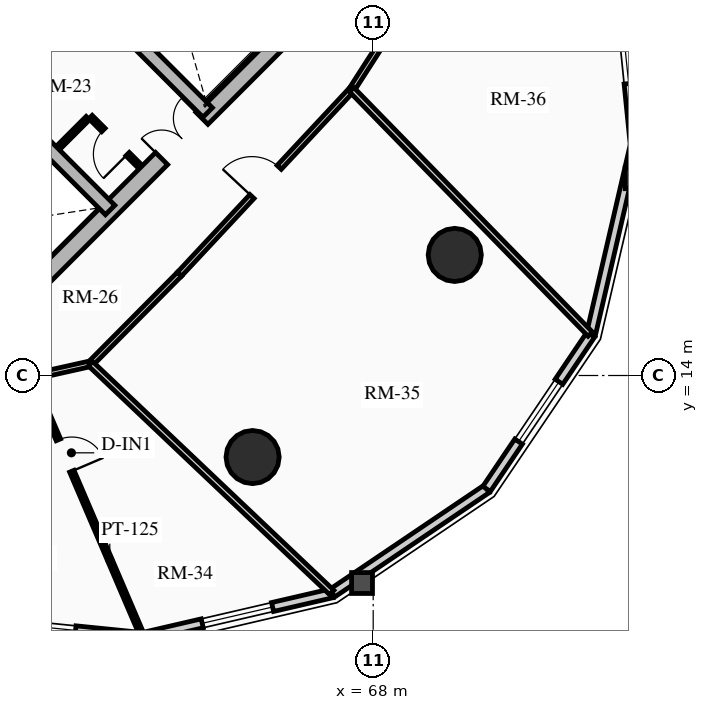
"""IFC4 building model, lengths in metres.
Left out: names, types, materials, properties, quantities, classifications, styles, units other than length and angle.
Written with IfcOpenShell. Run it as: python <this file> out.ifc"""

import sys

from ifc_helpers import new_model, si_unit, direction, frame, frame_2d, origin, origin_2d, place, context, subcontext, project, spatial, rectangle, circle, extrude, source, transform, mapped, element, fill, save


model = new_model("IFC4")
c1 = context("Model", 3, precision=1e-05, world=origin(), true_north=direction((0.0, 1.0)))
c2 = subcontext(c1, "Body", "Model", "MODEL_VIEW")
j1 = project(units=[si_unit("LENGTHUNIT", "METRE"), si_unit("PLANEANGLEUNIT", "RADIAN")], contexts=[c1])
p1 = place(None, origin())
s1 = spatial("IfcSite", under=j1, at=p1, CompositionType="ELEMENT")
p2 = place(p1, origin())
s2 = spatial("IfcBuilding", under=s1, at=p2, CompositionType="ELEMENT")
p3 = place(p2, frame((0.0, 0.0, 81.79)))
s3 = spatial("IfcBuildingStorey", under=s2, at=p3, CompositionType="ELEMENT", Elevation=81.79)
p4 = place(p3, frame((58.578, 15.856, 0.0), z_axis=(0.0, 0.0, 1.0), x_axis=(0.707106781187, 0.707106781187, 0.0)))
e1 = element("IfcWall", 1, at=p4, inside=s3, PredefinedType="SHEAR", context=c2, shape_type="SweptSolid", body=[
    extrude(rectangle(XDim=10.7, YDim=0.45, at=frame_2d((5.35, 0.0))), origin(), (0.0, 0.0, 1.0), 2.91),
])
m1 = source(origin(), c2, "Body", "SweptSolid", [
    extrude(rectangle(XDim=1.5, YDim=2.02, at=frame_2d((0.75, 1.01))), frame((0.0, 0.235, 0.0), z_axis=(0.0, -1.0, 0.0), x_axis=(1.0, 0.0, 0.0)), (0.0, 0.0, 1.0), 0.47),
])
p5 = place(p4, frame((5.45, 0.0, 0.0)))
e2 = element("IfcOpeningElement", 2, at=p5, cuts=e1, PredefinedType="OPENING", context=c2, shape_type="MappedRepresentation", body=[
    mapped(m1, transform((0.0, 0.0, 0.0), x_axis=(1.0, 0.0, 0.0), y_axis=(0.0, 1.0, 0.0), z_axis=(0.0, 0.0, 1.0), scale=1.0)),
])
p6 = place(p3, frame((61.078, 18.355, 0.0), z_axis=(0.0, 0.0, 1.0), x_axis=(-0.707106781187, 0.707106781187, 0.0)))
e3 = element("IfcWall", 3, at=p6, inside=s3, PredefinedType="SHEAR", context=c2, shape_type="SweptSolid", body=[
    extrude(rectangle(XDim=13.75, YDim=0.35, at=frame_2d((6.875, 0.0))), origin(), (0.0, 0.0, 1.0), 2.91),
])
m2 = source(origin(), c2, "Body", "SweptSolid", [
    extrude(rectangle(XDim=1.1, YDim=2.015, at=frame_2d((0.55, 1.007))), frame((0.0, 0.185, 0.0), z_axis=(0.0, -1.0, 0.0), x_axis=(1.0, 0.0, 0.0)), (0.0, 0.0, 1.0), 0.37),
])
p7 = place(p6, frame((4.875, 0.0, 0.0)))
e4 = element("IfcOpeningElement", 4, at=p7, cuts=e3, PredefinedType="OPENING", context=c2, shape_type="MappedRepresentation", body=[
    mapped(m2, transform((0.0, 0.0, 0.0), x_axis=(1.0, 0.0, 0.0), y_axis=(0.0, 1.0, 0.0), z_axis=(0.0, 0.0, 1.0), scale=1.0)),
])
m3 = source(origin(), c2, "Body", "SweptSolid", [
    extrude(rectangle(XDim=1.15, YDim=2.02, at=frame_2d((0.575, 1.01))), frame((0.0, 0.185, 0.0), z_axis=(0.0, -1.0, 0.0), x_axis=(1.0, 0.0, 0.0)), (0.0, 0.0, 1.0), 0.37),
])
p8 = place(p6, frame((7.295, 0.0, 0.0)))
e5 = element("IfcOpeningElement", 5, at=p8, cuts=e3, PredefinedType="OPENING", context=c2, shape_type="MappedRepresentation", body=[
    mapped(m3, transform((0.0, 0.0, 0.0), x_axis=(1.0, 0.0, 0.0), y_axis=(0.0, 1.0, 0.0), z_axis=(0.0, 0.0, 1.0), scale=1.0)),
])
p9 = place(p3, frame((63.645, 20.922, 0.0), z_axis=(0.0, 0.0, 1.0), x_axis=(-0.707106781187, 0.707106781187, 0.0)))
e6 = element("IfcWall", 6, at=p9, inside=s3, PredefinedType="SHEAR", context=c2, shape_type="SweptSolid", body=[
    extrude(rectangle(XDim=13.75, YDim=0.35, at=frame_2d((6.875, 0.0))), origin(), (0.0, 0.0, 1.0), 2.91),
])
p10 = place(p9, frame((10.0, 0.0, 0.0)))
e7 = element("IfcOpeningElement", 7, at=p10, cuts=e6, PredefinedType="OPENING", context=c2, shape_type="MappedRepresentation", body=[
    mapped(m2, transform((0.0, 0.0, 0.0), x_axis=(1.0, 0.0, 0.0), y_axis=(0.0, 1.0, 0.0), z_axis=(0.0, 0.0, 1.0), scale=1.0)),
])
p11 = place(p9, frame((12.0, 0.0, 0.0)))
e8 = element("IfcOpeningElement", 8, at=p11, cuts=e6, PredefinedType="OPENING", context=c2, shape_type="MappedRepresentation", body=[
    mapped(m2, transform((0.0, 0.0, 0.0), x_axis=(1.0, 0.0, 0.0), y_axis=(0.0, 1.0, 0.0), z_axis=(0.0, 0.0, 1.0), scale=1.0)),
])
p12 = place(p9, frame((5.305, 0.0, 0.0)))
e9 = element("IfcOpeningElement", 9, at=p12, cuts=e6, PredefinedType="OPENING", context=c2, shape_type="MappedRepresentation", body=[
    mapped(m3, transform((0.0, 0.0, 0.0), x_axis=(1.0, 0.0, 0.0), y_axis=(0.0, 1.0, 0.0), z_axis=(0.0, 0.0, 1.0), scale=1.0)),
])
for number, where, z_axis, x_axis in (
    (10, (64.827, 11.854, 0.0), (0.0, 0.0, 1.0), (1.0, 0.0, 0.0)),
    (11, (70.146, 17.173, 0.0), (0.0, 0.0, 1.0), (1.0, 0.0, 0.0)),
):
    element("IfcColumn", number, at=place(p3, frame(where, z_axis=z_axis, x_axis=x_axis)), inside=s3, PredefinedType="USERDEFINED", context=c2, shape_type="SweptSolid", body=[
        extrude(circle(Radius=0.7, at=origin_2d()), origin(), (0.0, 0.0, 1.0), 2.91),
    ])
p13 = place(p3, frame((61.933, 7.115, 0.0), z_axis=(0.0, 0.0, 1.0), x_axis=(-0.994971754311, 0.10015591906, 0.0)))
e12 = element("IfcWall", 12, at=p13, inside=s3, PredefinedType="SOLIDWALL", context=c2, shape_type="SweptSolid", body=[
    extrude(rectangle(XDim=5.448, YDim=0.24, at=frame_2d((2.724, 0.0))), origin(), (0.0, 0.0, 1.0), 2.179),
])
m4 = source(origin(), c2, "Body", "SweptSolid", [
    extrude(rectangle(XDim=1.9, YDim=1.35, at=frame_2d((0.95, 0.675))), frame((0.0, 0.13, 0.0), z_axis=(0.0, -1.0, 0.0), x_axis=(1.0, 0.0, 0.0)), (0.0, 0.0, 1.0), 0.26),
])
p14 = place(p13, frame((1.774, 0.0, 0.65)))
e13 = element("IfcOpeningElement", 13, at=p14, cuts=e12, PredefinedType="OPENING", context=c2, shape_type="MappedRepresentation", body=[
    mapped(m4, transform((0.0, 0.0, 0.0), x_axis=(1.0, 0.0, 0.0), y_axis=(0.0, 1.0, 0.0), z_axis=(0.0, 0.0, 1.0), scale=1.0)),
])
p15 = place(p3, frame((66.92, 8.271, 0.0), z_axis=(0.0, 0.0, 1.0), x_axis=(-0.974165631126, -0.225834725257, 0.0)))
e14 = element("IfcWall", 14, at=p15, inside=s3, PredefinedType="SOLIDWALL", context=c2, shape_type="SweptSolid", body=[
    extrude(rectangle(XDim=5.119, YDim=0.24, at=frame_2d((2.56, 0.0))), origin(), (0.0, 0.0, 1.0), 2.179),
])
p16 = place(p15, frame((1.609, 0.0, 0.65)))
e15 = element("IfcOpeningElement", 15, at=p16, cuts=e14, PredefinedType="OPENING", context=c2, shape_type="MappedRepresentation", body=[
    mapped(m4, transform((0.0, 0.0, 0.0), x_axis=(1.0, 0.0, 0.0), y_axis=(0.0, 1.0, 0.0), z_axis=(0.0, 0.0, 1.0), scale=1.0)),
])
p17 = place(p3, frame((70.985, 11.015, 0.0), z_axis=(0.0, 0.0, 1.0), x_axis=(-0.828781148131, -0.559572880421, 0.0)))
e16 = element("IfcWall", 16, at=p17, inside=s3, PredefinedType="SOLIDWALL", context=c2, shape_type="SweptSolid", body=[
    extrude(rectangle(XDim=4.905, YDim=0.24, at=frame_2d((2.452, 0.0))), origin(), (0.0, 0.0, 1.0), 2.179),
])
p18 = place(p3, frame((73.729, 15.08, 0.0), z_axis=(0.0, 0.0, 1.0), x_axis=(-0.559572880421, -0.828781148131, 0.0)))
e17 = element("IfcWall", 17, at=p18, inside=s3, PredefinedType="SOLIDWALL", context=c2, shape_type="SweptSolid", body=[
    extrude(rectangle(XDim=4.905, YDim=0.24, at=frame_2d((2.452, 0.0))), origin(), (0.0, 0.0, 1.0), 2.179),
])
p19 = place(p18, frame((1.502, 0.0, 0.65)))
e18 = element("IfcOpeningElement", 18, at=p19, cuts=e17, PredefinedType="OPENING", context=c2, shape_type="MappedRepresentation", body=[
    mapped(m4, transform((0.0, 0.0, 0.0), x_axis=(1.0, 0.0, 0.0), y_axis=(0.0, 1.0, 0.0), z_axis=(0.0, 0.0, 1.0), scale=1.0)),
])
p20 = place(p3, frame((74.885, 20.067, 0.0), z_axis=(0.0, 0.0, 1.0), x_axis=(-0.225834725257, -0.974165631126, 0.0)))
e19 = element("IfcWall", 19, at=p20, inside=s3, PredefinedType="SOLIDWALL", context=c2, shape_type="SweptSolid", body=[
    extrude(rectangle(XDim=5.119, YDim=0.24, at=frame_2d((2.56, 0.0))), origin(), (0.0, 0.0, 1.0), 2.179),
])
p21 = place(p3, frame((74.339, 25.487, 0.0), z_axis=(0.0, 0.0, 1.0), x_axis=(0.10015591906, -0.994971754311, 0.0)))
e20 = element("IfcWall", 20, at=p21, inside=s3, PredefinedType="SOLIDWALL", context=c2, shape_type="SweptSolid", body=[
    extrude(rectangle(XDim=5.448, YDim=0.24, at=frame_2d((2.724, 0.0))), origin(), (0.0, 0.0, 1.0), 2.179),
])
m5 = source(origin(), c2, "Body", "SweptSolid", [
    extrude(rectangle(XDim=2.2, YDim=1.35, at=frame_2d((1.1, 0.675))), frame((0.0, 0.13, 0.0), z_axis=(0.0, -1.0, 0.0), x_axis=(1.0, 0.0, 0.0)), (0.0, 0.0, 1.0), 0.26),
])
p22 = place(p21, frame((1.624, 0.0, 0.65)))
e21 = element("IfcOpeningElement", 21, at=p22, cuts=e20, PredefinedType="OPENING", context=c2, shape_type="MappedRepresentation", body=[
    mapped(m5, transform((0.0, 0.0, 0.0), x_axis=(1.0, 0.0, 0.0), y_axis=(0.0, 1.0, 0.0), z_axis=(0.0, 0.0, 1.0), scale=1.0)),
])
p23 = place(p3, frame((58.214, 21.467, 0.0), z_axis=(0.0, 0.0, 1.0), x_axis=(0.707106781187, 0.707106781187, 0.0)))
e22 = element("IfcWall", 22, at=p23, inside=s3, PredefinedType="PARTITIONING", context=c2, shape_type="SweptSolid", body=[
    extrude(rectangle(XDim=3.28, YDim=0.2, at=frame_2d((1.64, 0.0))), origin(), (0.0, 0.0, 1.0), 2.655),
])
m6 = source(origin(), c2, "Body", "SweptSolid", [
    extrude(rectangle(XDim=1.5, YDim=2.02, at=frame_2d((0.75, 1.01))), frame((0.0, 0.11, 0.0), z_axis=(0.0, -1.0, 0.0), x_axis=(1.0, 0.0, 0.0)), (0.0, 0.0, 1.0), 0.22),
])
p24 = place(p23, frame((1.55, 0.0, 0.0)))
e23 = element("IfcOpeningElement", 23, at=p24, cuts=e22, PredefinedType="OPENING", context=c2, shape_type="MappedRepresentation", body=[
    mapped(m6, transform((0.0, 0.0, 0.0), x_axis=(1.0, 0.0, 0.0), y_axis=(0.0, 1.0, 0.0), z_axis=(0.0, 0.0, 1.0), scale=1.0)),
])
p25 = place(p3, frame((61.835, 19.529, 0.0), z_axis=(0.0, 0.0, 1.0), x_axis=(-0.707174592913, 0.707038962956, 0.0)))
e24 = element("IfcWall", 24, at=p25, inside=s3, PredefinedType="PARTITIONING", context=c2, shape_type="SweptSolid", body=[
    extrude(rectangle(XDim=1.8, YDim=0.125, at=frame_2d((0.9, 0.0))), origin(), (0.0, 0.0, 1.0), 2.655),
])
m7 = source(origin(), c2, "Body", "SweptSolid", [
    extrude(rectangle(XDim=0.9, YDim=2.005, at=frame_2d((0.45, 1.002))), frame((0.0, 0.073, 0.0), z_axis=(0.0, -1.0, 0.0), x_axis=(1.0, 0.0, 0.0)), (0.0, 0.0, 1.0), 0.145),
])
p26 = place(p25, frame((0.42, 0.0, 0.0)))
e25 = element("IfcOpeningElement", 25, at=p26, cuts=e24, PredefinedType="OPENING", context=c2, shape_type="MappedRepresentation", body=[
    mapped(m7, transform((0.0, 0.0, 0.0), x_axis=(1.0, 0.0, 0.0), y_axis=(0.0, 1.0, 0.0), z_axis=(0.0, 0.0, 1.0), scale=1.0)),
])
p27 = place(p3, frame((59.713, 19.996, 0.0), z_axis=(0.0, 0.0, 1.0), x_axis=(0.707217726, 0.706995818963, 0.0)))
e26 = element("IfcWall", 26, at=p27, inside=s3, PredefinedType="PARTITIONING", context=c2, shape_type="SweptSolid", body=[
    extrude(rectangle(XDim=1.1, YDim=0.125, at=frame_2d((0.55, 0.0))), origin(), (0.0, 0.0, 1.0), 2.655),
])
p28 = place(p3, frame((59.008, 13.963, 0.0), z_axis=(0.0, 0.0, 1.0), x_axis=(0.976020856791, 0.21767702476, 0.0)))
e27 = element("IfcWall", 27, at=p28, inside=s3, PredefinedType="PARTITIONING", context=c2, shape_type="SweptSolid", body=[
    extrude(rectangle(XDim=1.593, YDim=0.15, at=frame_2d((0.796, 0.0))), origin(), (0.0, 0.0, 1.0), 2.225),
])
p29 = place(p3, frame((60.562, 14.31, 0.0), z_axis=(0.0, 0.0, 1.0), x_axis=(0.704566236161, 0.709638230975, 0.0)))
e28 = element("IfcWall", 28, at=p29, inside=s3, PredefinedType="PARTITIONING", context=c2, shape_type="SweptSolid", body=[
    extrude(rectangle(XDim=3.321, YDim=0.15, at=frame_2d((1.661, 0.0))), origin(), (0.0, 0.0, 1.0), 2.225),
])
p30 = place(p3, frame((62.903, 16.667, 0.0), z_axis=(0.0, 0.0, 1.0), x_axis=(0.682371947497, 0.731005147225, 0.0)))
e29 = element("IfcWall", 29, at=p30, inside=s3, PredefinedType="PARTITIONING", context=c2, shape_type="SweptSolid", body=[
    extrude(rectangle(XDim=6.642, YDim=0.15, at=frame_2d((3.321, 0.0))), origin(), (0.0, 0.0, 1.0), 2.225),
])
m8 = source(origin(), c2, "Body", "SweptSolid", [
    extrude(rectangle(XDim=1.05, YDim=2.015, at=frame_2d((0.525, 1.007))), frame((0.0, 0.085, 0.0), z_axis=(0.0, -1.0, 0.0), x_axis=(1.0, 0.0, 0.0)), (0.0, 0.0, 1.0), 0.17),
])
p31 = place(p30, frame((2.796, 0.0, 0.0)))
e30 = element("IfcOpeningElement", 30, at=p31, cuts=e29, PredefinedType="OPENING", context=c2, shape_type="MappedRepresentation", body=[
    mapped(m8, transform((0.0, 0.0, 0.0), x_axis=(1.0, 0.0, 0.0), y_axis=(0.0, 1.0, 0.0), z_axis=(0.0, 0.0, 1.0), scale=1.0)),
])
p32 = place(p3, frame((67.435, 21.521, 0.0), z_axis=(0.0, 0.0, 1.0), x_axis=(0.540777197838, 0.841165870859, 0.0)))
e31 = element("IfcWall", 31, at=p32, inside=s3, PredefinedType="PARTITIONING", context=c2, shape_type="SweptSolid", body=[
    extrude(rectangle(XDim=1.888, YDim=0.15, at=frame_2d((0.944, 0.0))), origin(), (0.0, 0.0, 1.0), 2.225),
])
p33 = place(p3, frame((60.562, 14.31, 0.0), z_axis=(0.0, 0.0, 1.0), x_axis=(0.725582293335, -0.688135404989, 0.0)))
e32 = element("IfcWall", 32, at=p33, inside=s3, PredefinedType="PARTITIONING", context=c2, shape_type="SweptSolid", body=[
    extrude(rectangle(XDim=8.749, YDim=0.16, at=frame_2d((4.375, 0.0))), origin(), (0.0, 0.0, 1.0), 2.179),
])
p34 = place(p3, frame((67.435, 21.521, 0.0), z_axis=(0.0, 0.0, 1.0), x_axis=(0.6983880073, -0.715719352302, 0.0)))
e33 = element("IfcWall", 33, at=p34, inside=s3, PredefinedType="PARTITIONING", context=c2, shape_type="SweptSolid", body=[
    extrude(rectangle(XDim=8.987, YDim=0.16, at=frame_2d((4.494, 0.0))), origin(), (0.0, 0.0, 1.0), 2.179),
])
p35 = place(p3, frame((59.008, 13.963, 0.0), z_axis=(0.0, 0.0, 1.0), x_axis=(0.393439207333, -0.919350635032, 0.0)))
e34 = element("IfcWall", 34, at=p35, inside=s3, PredefinedType="PARTITIONING", context=c2, shape_type="SweptSolid", body=[
    extrude(rectangle(XDim=7.427, YDim=0.125, at=frame_2d((3.713, 0.0))), origin(), (0.0, 0.0, 1.0), 2.179),
])
p36 = place(p35, frame((1.8, 0.0, 0.0)))
e35 = element("IfcOpeningElement", 35, at=p36, cuts=e34, PredefinedType="OPENING", context=c2, shape_type="MappedRepresentation", body=[
    mapped(m7, transform((0.0, 0.0, 0.0), x_axis=(1.0, 0.0, 0.0), y_axis=(0.0, 1.0, 0.0), z_axis=(0.0, 0.0, 1.0), scale=1.0)),
])
m9 = source(origin(), c2, "Body", "SweptSolid", [
    extrude(rectangle(XDim=1.9, YDim=1.35, at=frame_2d((0.95, 0.675))), frame((0.0, 0.03, 0.0), z_axis=(0.0, -1.0, 0.0), x_axis=(1.0, 0.0, 0.0)), (0.0, 0.0, 1.0), 0.06),
])
p37 = place(p14, origin())
e36 = element("IfcWindow", 36, at=p37, inside=s3, PartitioningType="DOUBLE_PANEL_VERTICAL", PredefinedType="WINDOW", context=c2, shape_type="MappedRepresentation", body=[
    mapped(m9, transform((0.0, 0.0, 0.0), x_axis=(1.0, 0.0, 0.0), y_axis=(0.0, 1.0, 0.0), z_axis=(0.0, 0.0, 1.0), scale=1.0)),
])
fill(e13, e36)
p38 = place(p16, origin())
e37 = element("IfcWindow", 37, at=p38, inside=s3, PartitioningType="DOUBLE_PANEL_VERTICAL", PredefinedType="WINDOW", context=c2, shape_type="MappedRepresentation", body=[
    mapped(m9, transform((0.0, 0.0, 0.0), x_axis=(1.0, 0.0, 0.0), y_axis=(0.0, 1.0, 0.0), z_axis=(0.0, 0.0, 1.0), scale=1.0)),
])
fill(e15, e37)
p39 = place(p19, origin())
e38 = element("IfcWindow", 38, at=p39, inside=s3, PartitioningType="DOUBLE_PANEL_VERTICAL", PredefinedType="WINDOW", context=c2, shape_type="MappedRepresentation", body=[
    mapped(m9, transform((0.0, 0.0, 0.0), x_axis=(1.0, 0.0, 0.0), y_axis=(0.0, 1.0, 0.0), z_axis=(0.0, 0.0, 1.0), scale=1.0)),
])
fill(e18, e38)
m10 = source(origin(), c2, "Body", "SweptSolid", [
    extrude(rectangle(XDim=2.2, YDim=1.35, at=frame_2d((1.1, 0.675))), frame((0.0, 0.03, 0.0), z_axis=(0.0, -1.0, 0.0), x_axis=(1.0, 0.0, 0.0)), (0.0, 0.0, 1.0), 0.06),
])
p40 = place(p22, origin())
e39 = element("IfcWindow", 39, at=p40, inside=s3, PartitioningType="DOUBLE_PANEL_VERTICAL", PredefinedType="WINDOW", context=c2, shape_type="MappedRepresentation", body=[
    mapped(m10, transform((0.0, 0.0, 0.0), x_axis=(1.0, 0.0, 0.0), y_axis=(0.0, 1.0, 0.0), z_axis=(0.0, 0.0, 1.0), scale=1.0)),
])
fill(e21, e39)
m11 = source(origin(), c2, "Body", "SweptSolid", [
    extrude(rectangle(XDim=1.5, YDim=2.02, at=frame_2d((0.75, 1.01))), frame((0.0, 0.025, 0.0), z_axis=(0.0, -1.0, 0.0), x_axis=(1.0, 0.0, 0.0)), (0.0, 0.0, 1.0), 0.05),
])
p41 = place(p5, origin())
e40 = element("IfcDoor", 40, at=p41, inside=s3, OperationType="DOUBLE_DOOR_SINGLE_SWING", PredefinedType="DOOR", context=c2, shape_type="MappedRepresentation", body=[
    mapped(m11, transform((0.0, 0.0, 0.0), x_axis=(1.0, 0.0, 0.0), y_axis=(0.0, 1.0, 0.0), z_axis=(0.0, 0.0, 1.0), scale=1.0)),
])
fill(e2, e40)
m12 = source(origin(), c2, "Body", "SweptSolid", [
    extrude(rectangle(XDim=0.9, YDim=2.005, at=frame_2d((0.45, 1.002))), frame((0.0, 0.025, 0.0), z_axis=(0.0, -1.0, 0.0), x_axis=(1.0, 0.0, 0.0)), (0.0, 0.0, 1.0), 0.05),
])
p42 = place(p26, origin())
e41 = element("IfcDoor", 41, at=p42, inside=s3, OperationType="SINGLE_SWING_LEFT", PredefinedType="DOOR", context=c2, shape_type="MappedRepresentation", body=[
    mapped(m12, transform((0.0, 0.0, 0.0), x_axis=(1.0, 0.0, 0.0), y_axis=(0.0, 1.0, 0.0), z_axis=(0.0, 0.0, 1.0), scale=1.0)),
])
fill(e25, e41)
p43 = place(p36, origin())
e42 = element("IfcDoor", 42, at=p43, inside=s3, OperationType="SINGLE_SWING_RIGHT", PredefinedType="DOOR", context=c2, shape_type="MappedRepresentation", body=[
    mapped(m12, transform((0.0, 0.0, 0.0), x_axis=(1.0, 0.0, 0.0), y_axis=(0.0, 1.0, 0.0), z_axis=(0.0, 0.0, 1.0), scale=1.0)),
])
fill(e35, e42)
m13 = source(origin(), c2, "Body", "SweptSolid", [
    extrude(rectangle(XDim=1.05, YDim=2.015, at=frame_2d((0.525, 1.007))), frame((0.0, 0.025, 0.0), z_axis=(0.0, -1.0, 0.0), x_axis=(1.0, 0.0, 0.0)), (0.0, 0.0, 1.0), 0.05),
])
p44 = place(p31, origin())
e43 = element("IfcDoor", 43, at=p44, inside=s3, OperationType="SINGLE_SWING_LEFT", PredefinedType="DOOR", context=c2, shape_type="MappedRepresentation", body=[
    mapped(m13, transform((0.0, 0.0, 0.0), x_axis=(1.0, 0.0, 0.0), y_axis=(0.0, 1.0, 0.0), z_axis=(0.0, 0.0, 1.0), scale=1.0)),
])
fill(e30, e43)
save(model, sys.argv[1])
